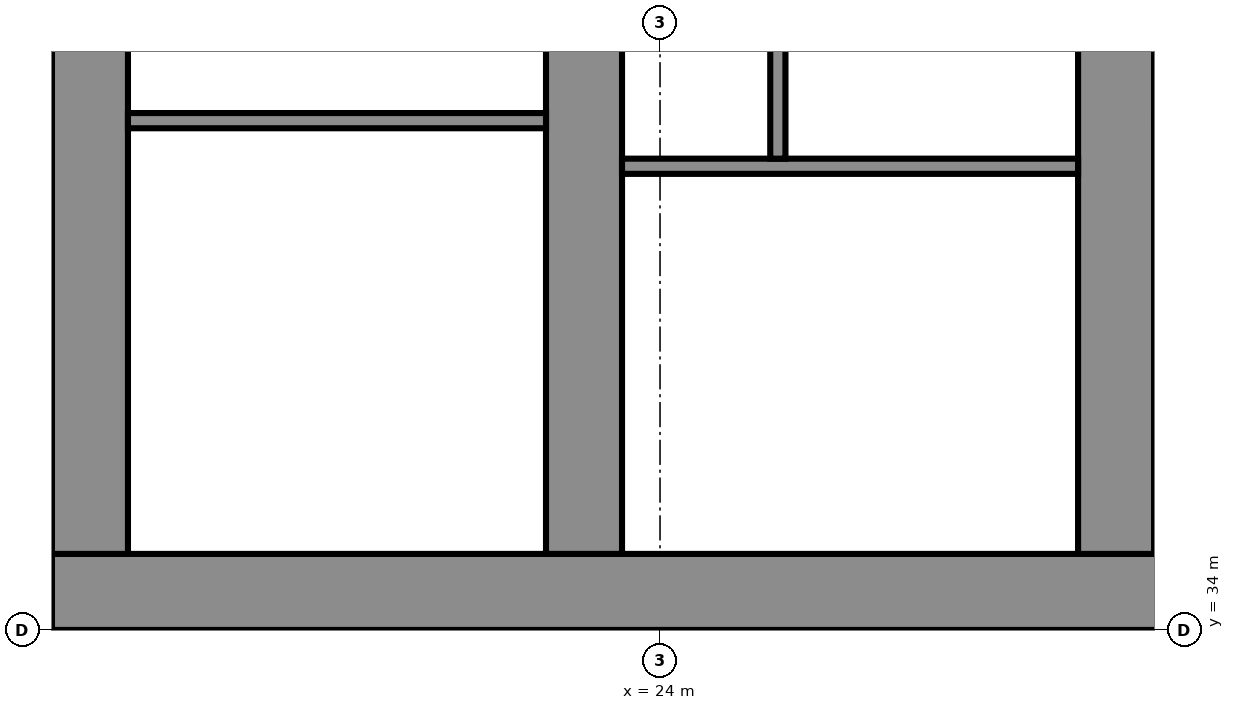
"""IFC4 building model, lengths in metres.
Left out: names, types, materials, properties, quantities, classifications, styles, units other than length and angle.
Written with IfcOpenShell. Run it as: python <this file> out.ifc"""

import sys

from ifc_helpers import new_model, si_unit, direction, frame, frame_2d, origin, place, context, subcontext, project, spatial, polyline, rectangle, outline, extrude, element, fill, save


model = new_model("IFC4")
c1 = context("Model", 3, precision=1e-05, world=origin(), true_north=direction((0.0, 1.0)))
c2 = subcontext(c1, "Body", "Model", "MODEL_VIEW")
j1 = project(units=[si_unit("LENGTHUNIT", "METRE"), si_unit("PLANEANGLEUNIT", "RADIAN")], contexts=[c1])
p1 = place(None, origin())
s1 = spatial("IfcSite", under=j1, at=p1, CompositionType="ELEMENT")
p2 = place(p1, origin())
s2 = spatial("IfcBuilding", under=s1, at=p2, CompositionType="ELEMENT")
p3 = place(p2, frame((0.0, 0.0, 96.7)))
s3 = spatial("IfcBuildingStorey", under=s2, at=p3, CompositionType="ELEMENT", Elevation=96.7)
p4 = place(p3, frame((16.0, 34.5, 0.0), z_axis=(0.0, 0.0, 1.0), x_axis=(1.0, 0.0, 0.0)))
e1 = element("IfcWall", 1, at=p4, inside=s3, PredefinedType="SHEAR", context=c2, shape_type="SweptSolid", body=[
    extrude(rectangle(XDim=49.0, YDim=1.0, at=frame_2d((24.5, 0.0))), origin(), (0.0, 0.0, 1.0), 3.6),
])
p5 = place(p4, frame((1.2, 0.0, 0.0)))
e2 = element("IfcOpeningElement", 2, at=p5, cuts=e1, PredefinedType="OPENING", context=c2, shape_type="SweptSolid", body=[
    extrude(rectangle(XDim=1.1, YDim=2.1, at=frame_2d((0.55, 1.05))), frame((0.0, 0.51, 0.0), z_axis=(0.0, -1.0, 0.0), x_axis=(1.0, 0.0, 0.0)), (0.0, 0.0, 1.0), 1.02),
])
p6 = place(p4, frame((5.083, 0.0, 0.0)))
e3 = element("IfcOpeningElement", 3, at=p6, cuts=e1, PredefinedType="OPENING", context=c2, shape_type="SweptSolid", body=[
    extrude(rectangle(XDim=1.1, YDim=2.1, at=frame_2d((0.55, 1.05))), frame((0.0, 0.51, 0.0), z_axis=(0.0, -1.0, 0.0), x_axis=(1.0, 0.0, 0.0)), (0.0, 0.0, 1.0), 1.02),
])
p7 = place(p4, frame((2.933, 0.0, 0.0)))
e4 = element("IfcOpeningElement", 4, at=p7, cuts=e1, PredefinedType="OPENING", context=c2, shape_type="SweptSolid", body=[
    extrude(rectangle(XDim=1.4, YDim=2.1, at=frame_2d((0.7, 1.05))), frame((0.0, 0.51, 0.0), z_axis=(0.0, -1.0, 0.0), x_axis=(1.0, 0.0, 0.0)), (0.0, 0.0, 1.0), 1.02),
])
p8 = place(p4, frame((7.65, 0.0, 0.0)))
e5 = element("IfcOpeningElement", 5, at=p8, cuts=e1, PredefinedType="OPENING", context=c2, shape_type="SweptSolid", body=[
    extrude(rectangle(XDim=1.2, YDim=2.1, at=frame_2d((0.6, 1.05))), frame((0.0, 0.51, 0.0), z_axis=(0.0, -1.0, 0.0), x_axis=(1.0, 0.0, 0.0)), (0.0, 0.0, 1.0), 1.02),
])
p9 = place(p4, frame((14.817, 0.0, 0.0)))
e6 = element("IfcOpeningElement", 6, at=p9, cuts=e1, PredefinedType="OPENING", context=c2, shape_type="SweptSolid", body=[
    extrude(rectangle(XDim=1.1, YDim=2.1, at=frame_2d((0.55, 1.05))), frame((0.0, 0.51, 0.0), z_axis=(0.0, -1.0, 0.0), x_axis=(1.0, 0.0, 0.0)), (0.0, 0.0, 1.0), 1.02),
])
p10 = place(p4, frame((19.083, 0.0, 0.0)))
e7 = element("IfcOpeningElement", 7, at=p10, cuts=e1, PredefinedType="OPENING", context=c2, shape_type="SweptSolid", body=[
    extrude(rectangle(XDim=1.1, YDim=2.1, at=frame_2d((0.55, 1.05))), frame((0.0, 0.51, 0.0), z_axis=(0.0, -1.0, 0.0), x_axis=(1.0, 0.0, 0.0)), (0.0, 0.0, 1.0), 1.02),
])
p11 = place(p4, frame((16.8, 0.0, 0.0)))
e8 = element("IfcOpeningElement", 8, at=p11, cuts=e1, PredefinedType="OPENING", context=c2, shape_type="SweptSolid", body=[
    extrude(rectangle(XDim=1.4, YDim=2.1, at=frame_2d((0.7, 1.05))), frame((0.0, 0.51, 0.0), z_axis=(0.0, -1.0, 0.0), x_axis=(1.0, 0.0, 0.0)), (0.0, 0.0, 1.0), 1.02),
])
p12 = place(p4, frame((21.817, 0.0, 0.0)))
e9 = element("IfcOpeningElement", 9, at=p12, cuts=e1, PredefinedType="OPENING", context=c2, shape_type="SweptSolid", body=[
    extrude(rectangle(XDim=1.1, YDim=2.1, at=frame_2d((0.55, 1.05))), frame((0.0, 0.51, 0.0), z_axis=(0.0, -1.0, 0.0), x_axis=(1.0, 0.0, 0.0)), (0.0, 0.0, 1.0), 1.02),
])
p13 = place(p4, frame((26.083, 0.0, 0.0)))
e10 = element("IfcOpeningElement", 10, at=p13, cuts=e1, PredefinedType="OPENING", context=c2, shape_type="SweptSolid", body=[
    extrude(rectangle(XDim=1.1, YDim=2.1, at=frame_2d((0.55, 1.05))), frame((0.0, 0.51, 0.0), z_axis=(0.0, -1.0, 0.0), x_axis=(1.0, 0.0, 0.0)), (0.0, 0.0, 1.0), 1.02),
])
p14 = place(p4, frame((33.15, 0.0, 0.0)))
e11 = element("IfcOpeningElement", 11, at=p14, cuts=e1, PredefinedType="OPENING", context=c2, shape_type="SweptSolid", body=[
    extrude(rectangle(XDim=1.2, YDim=2.1, at=frame_2d((0.6, 1.05))), frame((0.0, 0.51, 0.0), z_axis=(0.0, -1.0, 0.0), x_axis=(1.0, 0.0, 0.0)), (0.0, 0.0, 1.0), 1.02),
])
p15 = place(p4, frame((37.8, 0.0, 0.0)))
e12 = element("IfcOpeningElement", 12, at=p15, cuts=e1, PredefinedType="OPENING", context=c2, shape_type="SweptSolid", body=[
    extrude(rectangle(XDim=1.4, YDim=2.1, at=frame_2d((0.7, 1.05))), frame((0.0, 0.51, 0.0), z_axis=(0.0, -1.0, 0.0), x_axis=(1.0, 0.0, 0.0)), (0.0, 0.0, 1.0), 1.02),
])
p16 = place(p4, frame((42.817, 0.0, 0.0)))
e13 = element("IfcOpeningElement", 13, at=p16, cuts=e1, PredefinedType="OPENING", context=c2, shape_type="SweptSolid", body=[
    extrude(rectangle(XDim=1.1, YDim=2.1, at=frame_2d((0.55, 1.05))), frame((0.0, 0.51, 0.0), z_axis=(0.0, -1.0, 0.0), x_axis=(1.0, 0.0, 0.0)), (0.0, 0.0, 1.0), 1.02),
])
p17 = place(p4, frame((46.7, 0.0, 0.0)))
e14 = element("IfcOpeningElement", 14, at=p17, cuts=e1, PredefinedType="OPENING", context=c2, shape_type="SweptSolid", body=[
    extrude(rectangle(XDim=1.1, YDim=2.1, at=frame_2d((0.55, 1.05))), frame((0.0, 0.51, 0.0), z_axis=(0.0, -1.0, 0.0), x_axis=(1.0, 0.0, 0.0)), (0.0, 0.0, 1.0), 1.02),
])
p18 = place(p4, frame((44.667, 0.0, 0.0)))
e15 = element("IfcOpeningElement", 15, at=p18, cuts=e1, PredefinedType="OPENING", context=c2, shape_type="SweptSolid", body=[
    extrude(rectangle(XDim=1.4, YDim=2.1, at=frame_2d((0.7, 1.05))), frame((0.0, 0.51, 0.0), z_axis=(0.0, -1.0, 0.0), x_axis=(1.0, 0.0, 0.0)), (0.0, 0.0, 1.0), 1.02),
])
p19 = place(p3, frame((16.5, 35.0, 0.0), z_axis=(0.0, 0.0, 1.0), x_axis=(0.0, 1.0, 0.0)))
e16 = element("IfcWall", 16, at=p19, inside=s3, PredefinedType="SHEAR", context=c2, shape_type="SweptSolid", body=[
    extrude(rectangle(XDim=12.784, YDim=1.0, at=frame_2d((6.392, 0.0))), origin(), (0.0, 0.0, 1.0), 3.6),
])
p20 = place(p3, frame((23.0, 35.0, 0.0), z_axis=(0.0, 0.0, 1.0), x_axis=(0.0, 1.0, 0.0)))
e17 = element("IfcWall", 17, at=p20, inside=s3, PredefinedType="SHEAR", context=c2, shape_type="SweptSolid", body=[
    extrude(rectangle(XDim=13.352, YDim=1.0, at=frame_2d((6.676, 0.0))), origin(), (0.0, 0.0, 1.0), 3.6),
])
p21 = place(p20, frame((10.426, 0.0, 0.0)))
e18 = element("IfcOpeningElement", 18, at=p21, cuts=e17, PredefinedType="OPENING", context=c2, shape_type="SweptSolid", body=[
    extrude(rectangle(XDim=1.0, YDim=2.1, at=frame_2d((0.5, 1.05))), frame((0.0, 0.51, 0.0), z_axis=(0.0, -1.0, 0.0), x_axis=(1.0, 0.0, 0.0)), (0.0, 0.0, 1.0), 1.02),
])
p22 = place(p20, frame((3.4, 0.0, 0.0)))
e19 = element("IfcOpeningElement", 19, at=p22, cuts=e17, PredefinedType="OPENING", context=c2, shape_type="SweptSolid", body=[
    extrude(rectangle(XDim=1.1, YDim=2.1, at=frame_2d((0.55, 1.05))), frame((0.0, 0.51, 0.0), z_axis=(0.0, -1.0, 0.0), x_axis=(1.0, 0.0, 0.0)), (0.0, 0.0, 1.0), 1.02),
])
p23 = place(p3, frame((30.0, 35.0, 0.0), z_axis=(0.0, 0.0, 1.0), x_axis=(0.0, 1.0, 0.0)))
e20 = element("IfcWall", 20, at=p23, inside=s3, PredefinedType="SHEAR", context=c2, shape_type="SweptSolid", body=[
    extrude(rectangle(XDim=13.965, YDim=1.0, at=frame_2d((6.982, 0.0))), origin(), (0.0, 0.0, 1.0), 3.6),
])
p24 = place(p23, frame((3.4, 0.0, 0.0)))
e21 = element("IfcOpeningElement", 21, at=p24, cuts=e20, PredefinedType="OPENING", context=c2, shape_type="SweptSolid", body=[
    extrude(rectangle(XDim=1.1, YDim=2.1, at=frame_2d((0.55, 1.05))), frame((0.0, 0.51, 0.0), z_axis=(0.0, -1.0, 0.0), x_axis=(1.0, 0.0, 0.0)), (0.0, 0.0, 1.0), 1.02),
])
p25 = place(p3, frame((17.0, 40.7, 0.0), z_axis=(0.0, 0.0, 1.0), x_axis=(1.0, 0.0, 0.0)))
e22 = element("IfcWall", 22, at=p25, inside=s3, PredefinedType="PARTITIONING", context=c2, shape_type="SweptSolid", body=[
    extrude(rectangle(XDim=5.5, YDim=0.2, at=frame_2d((2.75, 0.0))), origin(), (0.0, 0.0, 1.0), 3.2),
])
p26 = place(p25, frame((0.2, 0.0, 0.0)))
e23 = element("IfcOpeningElement", 23, at=p26, cuts=e22, PredefinedType="OPENING", context=c2, shape_type="SweptSolid", body=[
    extrude(rectangle(XDim=1.1, YDim=2.1, at=frame_2d((0.55, 1.05))), frame((0.0, 0.11, 0.0), z_axis=(0.0, -1.0, 0.0), x_axis=(1.0, 0.0, 0.0)), (0.0, 0.0, 1.0), 0.22),
])
p27 = place(p25, frame((2.083, 0.0, 0.0)))
e24 = element("IfcOpeningElement", 24, at=p27, cuts=e22, PredefinedType="OPENING", context=c2, shape_type="SweptSolid", body=[
    extrude(rectangle(XDim=1.1, YDim=2.1, at=frame_2d((0.55, 1.05))), frame((0.0, 0.11, 0.0), z_axis=(0.0, -1.0, 0.0), x_axis=(1.0, 0.0, 0.0)), (0.0, 0.0, 1.0), 0.22),
])
p28 = place(p25, frame((4.083, 0.0, 0.0)))
e25 = element("IfcOpeningElement", 25, at=p28, cuts=e22, PredefinedType="OPENING", context=c2, shape_type="SweptSolid", body=[
    extrude(rectangle(XDim=1.1, YDim=2.1, at=frame_2d((0.55, 1.05))), frame((0.0, 0.11, 0.0), z_axis=(0.0, -1.0, 0.0), x_axis=(1.0, 0.0, 0.0)), (0.0, 0.0, 1.0), 0.22),
])
p29 = place(p3, frame((0.0, 0.0, -0.0)))
e26 = element("IfcWall", 26, at=p29, inside=s3, PredefinedType="PARTITIONING", context=c2, shape_type="SweptSolid", body=[
    extrude(outline(polyline([(18.5, 37.1), (17.0, 37.1), (17.0, 37.3), (18.5, 37.3), (18.7, 37.3), (18.7, 35.0), (18.5, 35.0), (18.5, 37.1)])), origin(), (0.0, 0.0, 1.0), 3.2),
])
p30 = place(p3, frame((0.0, 0.0, -0.0)))
e27 = element("IfcWall", 27, at=p30, inside=s3, PredefinedType="PARTITIONING", context=c2, shape_type="SweptSolid", body=[
    extrude(outline(polyline([(20.567, 37.3), (20.767, 37.3), (22.5, 37.3), (22.5, 37.1), (20.767, 37.1), (20.767, 35.0), (20.567, 35.0), (20.567, 37.3)])), origin(), (0.0, 0.0, 1.0), 3.2),
])
p31 = place(p3, frame((0.0, 0.0, -0.0)))
e28 = element("IfcWall", 28, at=p31, inside=s3, PredefinedType="PARTITIONING", context=c2, shape_type="SweptSolid", body=[
    extrude(outline(polyline([(18.7, 40.8), (18.5, 40.8), (18.5, 43.8), (17.0, 43.8), (17.0, 44.0), (22.5, 44.0), (22.5, 43.8), (20.767, 43.8), (20.767, 40.8), (20.567, 40.8), (20.567, 43.8), (18.7, 43.8), (18.7, 40.8)])), origin(), (0.0, 0.0, 1.0), 3.2),
])
p32 = place(p3, frame((23.5, 40.1, 0.0), z_axis=(0.0, 0.0, 1.0), x_axis=(1.0, 0.0, 0.0)))
e29 = element("IfcWall", 29, at=p32, inside=s3, PredefinedType="SHEAR", context=c2, shape_type="SweptSolid", body=[
    extrude(rectangle(XDim=6.0, YDim=0.2, at=frame_2d((3.0, 0.0))), origin(), (0.0, 0.0, 1.0), 3.2),
])
p33 = place(p32, frame((3.425, 0.0, 0.0)))
e30 = element("IfcOpeningElement", 30, at=p33, cuts=e29, PredefinedType="OPENING", context=c2, shape_type="SweptSolid", body=[
    extrude(rectangle(XDim=1.2, YDim=2.1, at=frame_2d((0.6, 1.05))), frame((0.0, 0.11, 0.0), z_axis=(0.0, -1.0, 0.0), x_axis=(1.0, 0.0, 0.0)), (0.0, 0.0, 1.0), 0.22),
])
p34 = place(p32, frame((0.525, 0.0, 0.0)))
e31 = element("IfcOpeningElement", 31, at=p34, cuts=e29, PredefinedType="OPENING", context=c2, shape_type="SweptSolid", body=[
    extrude(rectangle(XDim=0.9, YDim=2.1, at=frame_2d((0.45, 1.05))), frame((0.0, 0.11, 0.0), z_axis=(0.0, -1.0, 0.0), x_axis=(1.0, 0.0, 0.0)), (0.0, 0.0, 1.0), 0.22),
])
p35 = place(p3, frame((25.55, 40.2, 0.0), z_axis=(0.0, 0.0, 1.0), x_axis=(0.0, 1.0, 0.0)))
e32 = element("IfcWall", 32, at=p35, inside=s3, PredefinedType="SHEAR", context=c2, shape_type="SweptSolid", body=[
    extrude(rectangle(XDim=7.2, YDim=0.2, at=frame_2d((3.6, 0.0))), origin(), (0.0, 0.0, 1.0), 3.2),
])
p36 = place(p5, origin())
e33 = element("IfcDoor", 33, at=p36, inside=s3, OperationType="DOUBLE_DOOR_SLIDING", PredefinedType="DOOR", context=c2, shape_type="SweptSolid", body=[
    extrude(rectangle(XDim=1.1, YDim=2.1, at=frame_2d((0.55, 1.05))), frame((0.0, 0.025, 0.0), z_axis=(0.0, -1.0, 0.0), x_axis=(1.0, 0.0, 0.0)), (0.0, 0.0, 1.0), 0.05),
])
fill(e2, e33)
p37 = place(p6, origin())
e34 = element("IfcDoor", 34, at=p37, inside=s3, OperationType="DOUBLE_DOOR_SLIDING", PredefinedType="DOOR", context=c2, shape_type="SweptSolid", body=[
    extrude(rectangle(XDim=1.1, YDim=2.1, at=frame_2d((0.55, 1.05))), frame((0.0, 0.025, 0.0), z_axis=(0.0, -1.0, 0.0), x_axis=(1.0, 0.0, 0.0)), (0.0, 0.0, 1.0), 0.05),
])
fill(e3, e34)
p38 = place(p7, origin())
e35 = element("IfcDoor", 35, at=p38, inside=s3, OperationType="DOUBLE_DOOR_SINGLE_SWING", PredefinedType="DOOR", context=c2, shape_type="SweptSolid", body=[
    extrude(rectangle(XDim=1.4, YDim=2.1, at=frame_2d((0.7, 1.05))), frame((0.0, 0.025, 0.0), z_axis=(0.0, -1.0, 0.0), x_axis=(1.0, 0.0, 0.0)), (0.0, 0.0, 1.0), 0.05),
])
fill(e4, e35)
p39 = place(p26, origin())
e36 = element("IfcDoor", 36, at=p39, inside=s3, OperationType="DOUBLE_DOOR_SLIDING", PredefinedType="DOOR", context=c2, shape_type="SweptSolid", body=[
    extrude(rectangle(XDim=1.1, YDim=2.1, at=frame_2d((0.55, 1.05))), frame((0.0, 0.025, 0.0), z_axis=(0.0, -1.0, 0.0), x_axis=(1.0, 0.0, 0.0)), (0.0, 0.0, 1.0), 0.05),
])
fill(e23, e36)
p40 = place(p27, origin())
e37 = element("IfcDoor", 37, at=p40, inside=s3, OperationType="DOUBLE_DOOR_SLIDING", PredefinedType="DOOR", context=c2, shape_type="SweptSolid", body=[
    extrude(rectangle(XDim=1.1, YDim=2.1, at=frame_2d((0.55, 1.05))), frame((0.0, 0.025, 0.0), z_axis=(0.0, -1.0, 0.0), x_axis=(1.0, 0.0, 0.0)), (0.0, 0.0, 1.0), 0.05),
])
fill(e24, e37)
p41 = place(p28, origin())
e38 = element("IfcDoor", 38, at=p41, inside=s3, OperationType="DOUBLE_DOOR_SLIDING", PredefinedType="DOOR", context=c2, shape_type="SweptSolid", body=[
    extrude(rectangle(XDim=1.1, YDim=2.1, at=frame_2d((0.55, 1.05))), frame((0.0, 0.025, 0.0), z_axis=(0.0, -1.0, 0.0), x_axis=(1.0, 0.0, 0.0)), (0.0, 0.0, 1.0), 0.05),
])
fill(e25, e38)
p42 = place(p33, origin())
e39 = element("IfcDoor", 39, at=p42, inside=s3, OperationType="SINGLE_SWING_RIGHT", PredefinedType="DOOR", context=c2, shape_type="SweptSolid", body=[
    extrude(rectangle(XDim=1.2, YDim=2.1, at=frame_2d((0.6, 1.05))), frame((0.0, 0.025, 0.0), z_axis=(0.0, -1.0, 0.0), x_axis=(1.0, 0.0, 0.0)), (0.0, 0.0, 1.0), 0.05),
])
fill(e30, e39)
p43 = place(p34, origin())
e40 = element("IfcDoor", 40, at=p43, inside=s3, OperationType="SINGLE_SWING_LEFT", PredefinedType="DOOR", context=c2, shape_type="SweptSolid", body=[
    extrude(rectangle(XDim=0.9, YDim=2.1, at=frame_2d((0.45, 1.05))), frame((0.0, 0.025, 0.0), z_axis=(0.0, -1.0, 0.0), x_axis=(1.0, 0.0, 0.0)), (0.0, 0.0, 1.0), 0.05),
])
fill(e31, e40)
p44 = place(p8, origin())
e41 = element("IfcDoor", 41, at=p44, inside=s3, OperationType="SINGLE_SWING_LEFT", PredefinedType="DOOR", context=c2, shape_type="SweptSolid", body=[
    extrude(rectangle(XDim=1.2, YDim=2.1, at=frame_2d((0.6, 1.05))), frame((0.0, 0.025, 0.0), z_axis=(0.0, -1.0, 0.0), x_axis=(1.0, 0.0, 0.0)), (0.0, 0.0, 1.0), 0.05),
])
fill(e5, e41)
p45 = place(p22, origin())
e42 = element("IfcDoor", 42, at=p45, inside=s3, OperationType="SINGLE_SWING_RIGHT", PredefinedType="DOOR", context=c2, shape_type="SweptSolid", body=[
    extrude(rectangle(XDim=1.1, YDim=2.1, at=frame_2d((0.55, 1.05))), frame((0.0, 0.025, 0.0), z_axis=(0.0, -1.0, 0.0), x_axis=(1.0, 0.0, 0.0)), (0.0, 0.0, 1.0), 0.05),
])
fill(e19, e42)
p46 = place(p24, origin())
e43 = element("IfcDoor", 43, at=p46, inside=s3, OperationType="SINGLE_SWING_LEFT", PredefinedType="DOOR", context=c2, shape_type="SweptSolid", body=[
    extrude(rectangle(XDim=1.1, YDim=2.1, at=frame_2d((0.55, 1.05))), frame((0.0, 0.025, 0.0), z_axis=(0.0, -1.0, 0.0), x_axis=(1.0, 0.0, 0.0)), (0.0, 0.0, 1.0), 0.05),
])
fill(e21, e43)
save(model, sys.argv[1])
